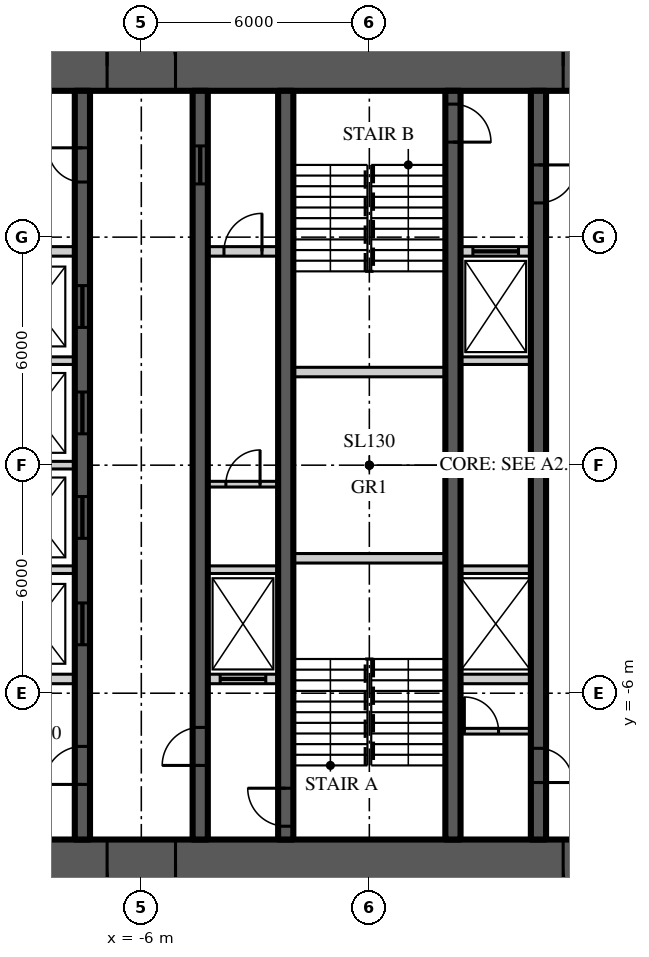
"""IFC4 building model, lengths in metres.
Left out: names, types, materials, properties, quantities, classifications, styles, units other than length and angle.
Written with IfcOpenShell. Run it as: python <this file> out.ifc"""

import sys

from ifc_helpers import new_model, si_unit, direction, frame, frame_2d, origin, place, context, subcontext, project, spatial, rectangle, extrude, element, fill, save


model = new_model("IFC4")
c1 = context("Model", 3, precision=1e-05, world=origin(), true_north=direction((0.0, 1.0)))
c2 = subcontext(c1, "Body", "Model", "MODEL_VIEW")
j1 = project(units=[si_unit("LENGTHUNIT", "METRE"), si_unit("PLANEANGLEUNIT", "RADIAN")], contexts=[c1])
p1 = place(None, origin())
s1 = spatial("IfcSite", under=j1, at=p1, CompositionType="ELEMENT")
p2 = place(p1, origin())
s2 = spatial("IfcBuilding", under=s1, at=p2, CompositionType="ELEMENT")
p3 = place(p2, frame((0.0, 0.0, 90.3)))
s3 = spatial("IfcBuildingStorey", under=s2, at=p3, CompositionType="ELEMENT", Elevation=90.3)
p4 = place(p3, frame((-11.15, 10.5, 0.0), z_axis=(0.0, 0.0, 1.0), x_axis=(1.0, 0.0, 0.0)))
e1 = element("IfcWall", 1, at=p4, inside=s3, PredefinedType="SHEAR", context=c2, shape_type="SweptSolid", body=[
    extrude(rectangle(XDim=22.3, YDim=1.3, at=frame_2d((11.15, 0.0))), origin(), (0.0, 0.0, 1.0), 3.9),
])
p5 = place(p4, frame((4.25, 0.0, 0.0)))
e2 = element("IfcOpeningElement", 2, at=p5, cuts=e1, PredefinedType="OPENING", context=c2, shape_type="SweptSolid", body=[
    extrude(rectangle(XDim=1.8, YDim=2.2, at=frame_2d((0.9, 1.1))), frame((0.0, 0.66, 0.0), z_axis=(0.0, -1.0, 0.0), x_axis=(1.0, 0.0, 0.0)), (0.0, 0.0, 1.0), 1.32),
])
p6 = place(p4, frame((16.25, 0.0, 0.0)))
e3 = element("IfcOpeningElement", 3, at=p6, cuts=e1, PredefinedType="OPENING", context=c2, shape_type="SweptSolid", body=[
    extrude(rectangle(XDim=1.8, YDim=2.2, at=frame_2d((0.9, 1.1))), frame((0.0, 0.66, 0.0), z_axis=(0.0, -1.0, 0.0), x_axis=(1.0, 0.0, 0.0)), (0.0, 0.0, 1.0), 1.32),
])
p7 = place(p3, frame((11.15, -10.5, 0.0), z_axis=(0.0, 0.0, 1.0), x_axis=(-1.0, 0.0, 0.0)))
e4 = element("IfcWall", 4, at=p7, inside=s3, PredefinedType="SHEAR", context=c2, shape_type="SweptSolid", body=[
    extrude(rectangle(XDim=22.3, YDim=1.3, at=frame_2d((11.15, 0.0))), origin(), (0.0, 0.0, 1.0), 3.9),
])
p8 = place(p7, frame((16.25, 0.0, 0.0)))
e5 = element("IfcOpeningElement", 5, at=p8, cuts=e4, PredefinedType="OPENING", context=c2, shape_type="SweptSolid", body=[
    extrude(rectangle(XDim=1.8, YDim=2.2, at=frame_2d((0.9, 1.1))), frame((0.0, 0.66, 0.0), z_axis=(0.0, -1.0, 0.0), x_axis=(1.0, 0.0, 0.0)), (0.0, 0.0, 1.0), 1.32),
])
p9 = place(p7, frame((4.25, 0.0, 0.0)))
e6 = element("IfcOpeningElement", 6, at=p9, cuts=e4, PredefinedType="OPENING", context=c2, shape_type="SweptSolid", body=[
    extrude(rectangle(XDim=1.8, YDim=2.2, at=frame_2d((0.9, 1.1))), frame((0.0, 0.66, 0.0), z_axis=(0.0, -1.0, 0.0), x_axis=(1.0, 0.0, 0.0)), (0.0, 0.0, 1.0), 1.32),
])
p10 = place(p3, frame((-7.55, -9.85, 0.0), z_axis=(0.0, 0.0, 1.0), x_axis=(0.0, 1.0, 0.0)))
e7 = element("IfcWall", 7, at=p10, inside=s3, PredefinedType="SHEAR", context=c2, shape_type="SweptSolid", body=[
    extrude(rectangle(XDim=19.7, YDim=0.4, at=frame_2d((9.85, 0.0))), origin(), (0.0, 0.0, 1.0), 3.9),
])
p11 = place(p10, frame((1.45, 0.0, 0.0)))
e8 = element("IfcOpeningElement", 8, at=p11, cuts=e7, PredefinedType="OPENING", context=c2, shape_type="SweptSolid", body=[
    extrude(rectangle(XDim=1.0, YDim=2.2, at=frame_2d((0.5, 1.1))), frame((0.0, 0.21, 0.0), z_axis=(0.0, -1.0, 0.0), x_axis=(1.0, 0.0, 0.0)), (0.0, 0.0, 1.0), 0.42),
])
p12 = place(p10, frame((17.3, 0.0, 0.0)))
e9 = element("IfcOpeningElement", 9, at=p12, cuts=e7, PredefinedType="OPENING", context=c2, shape_type="SweptSolid", body=[
    extrude(rectangle(XDim=0.9, YDim=2.1, at=frame_2d((0.45, 1.05))), frame((0.0, 0.21, 0.0), z_axis=(0.0, -1.0, 0.0), x_axis=(1.0, 0.0, 0.0)), (0.0, 0.0, 1.0), 0.42),
])
p13 = place(p10, frame((5.125, 0.0, 0.0)))
e10 = element("IfcOpeningElement", 10, at=p13, cuts=e7, PredefinedType="OPENING", context=c2, shape_type="SweptSolid", body=[
    extrude(rectangle(XDim=1.1, YDim=2.2, at=frame_2d((0.55, 1.1))), frame((0.0, 0.21, 0.0), z_axis=(0.0, -1.0, 0.0), x_axis=(1.0, 0.0, 0.0)), (0.0, 0.0, 1.0), 0.42),
])
p14 = place(p10, frame((7.925, 0.0, 0.0)))
e11 = element("IfcOpeningElement", 11, at=p14, cuts=e7, PredefinedType="OPENING", context=c2, shape_type="SweptSolid", body=[
    extrude(rectangle(XDim=1.1, YDim=2.2, at=frame_2d((0.55, 1.1))), frame((0.0, 0.21, 0.0), z_axis=(0.0, -1.0, 0.0), x_axis=(1.0, 0.0, 0.0)), (0.0, 0.0, 1.0), 0.42),
])
p15 = place(p10, frame((10.675, 0.0, 0.0)))
e12 = element("IfcOpeningElement", 12, at=p15, cuts=e7, PredefinedType="OPENING", context=c2, shape_type="SweptSolid", body=[
    extrude(rectangle(XDim=1.1, YDim=2.2, at=frame_2d((0.55, 1.1))), frame((0.0, 0.21, 0.0), z_axis=(0.0, -1.0, 0.0), x_axis=(1.0, 0.0, 0.0)), (0.0, 0.0, 1.0), 0.42),
])
p16 = place(p10, frame((13.475, 0.0, 0.0)))
e13 = element("IfcOpeningElement", 13, at=p16, cuts=e7, PredefinedType="OPENING", context=c2, shape_type="SweptSolid", body=[
    extrude(rectangle(XDim=1.1, YDim=2.2, at=frame_2d((0.55, 1.1))), frame((0.0, 0.21, 0.0), z_axis=(0.0, -1.0, 0.0), x_axis=(1.0, 0.0, 0.0)), (0.0, 0.0, 1.0), 0.42),
])
p17 = place(p3, frame((-4.45, -9.85, 0.0), z_axis=(0.0, 0.0, 1.0), x_axis=(0.0, 1.0, 0.0)))
e14 = element("IfcWall", 14, at=p17, inside=s3, PredefinedType="SHEAR", context=c2, shape_type="SweptSolid", body=[
    extrude(rectangle(XDim=19.7, YDim=0.4, at=frame_2d((9.85, 0.0))), origin(), (0.0, 0.0, 1.0), 3.9),
])
p18 = place(p17, frame((1.95, 0.0, 0.0)))
e15 = element("IfcOpeningElement", 15, at=p18, cuts=e14, PredefinedType="OPENING", context=c2, shape_type="SweptSolid", body=[
    extrude(rectangle(XDim=1.0, YDim=2.2, at=frame_2d((0.5, 1.1))), frame((0.0, 0.21, 0.0), z_axis=(0.0, -1.0, 0.0), x_axis=(1.0, 0.0, 0.0)), (0.0, 0.0, 1.0), 0.42),
])
p19 = place(p17, frame((17.25, 0.0, 0.0)))
e16 = element("IfcOpeningElement", 16, at=p19, cuts=e14, PredefinedType="OPENING", context=c2, shape_type="SweptSolid", body=[
    extrude(rectangle(XDim=1.0, YDim=2.1, at=frame_2d((0.5, 1.05))), frame((0.0, 0.21, 0.0), z_axis=(0.0, -1.0, 0.0), x_axis=(1.0, 0.0, 0.0)), (0.0, 0.0, 1.0), 0.42),
])
p20 = place(p3, frame((4.45, 9.85, 0.0), z_axis=(0.0, 0.0, 1.0), x_axis=(0.0, -1.0, 0.0)))
e17 = element("IfcWall", 17, at=p20, inside=s3, PredefinedType="SHEAR", context=c2, shape_type="SweptSolid", body=[
    extrude(rectangle(XDim=19.7, YDim=0.4, at=frame_2d((9.85, 0.0))), origin(), (0.0, 0.0, 1.0), 3.9),
])
p21 = place(p20, frame((1.95, 0.0, 0.0)))
e18 = element("IfcOpeningElement", 18, at=p21, cuts=e17, PredefinedType="OPENING", context=c2, shape_type="SweptSolid", body=[
    extrude(rectangle(XDim=1.0, YDim=2.2, at=frame_2d((0.5, 1.1))), frame((0.0, 0.21, 0.0), z_axis=(0.0, -1.0, 0.0), x_axis=(1.0, 0.0, 0.0)), (0.0, 0.0, 1.0), 0.42),
])
p22 = place(p20, frame((17.3, 0.0, 0.0)))
e19 = element("IfcOpeningElement", 19, at=p22, cuts=e17, PredefinedType="OPENING", context=c2, shape_type="SweptSolid", body=[
    extrude(rectangle(XDim=0.9, YDim=2.1, at=frame_2d((0.45, 1.05))), frame((0.0, 0.21, 0.0), z_axis=(0.0, -1.0, 0.0), x_axis=(1.0, 0.0, 0.0)), (0.0, 0.0, 1.0), 0.42),
])
p23 = place(p3, frame((-2.2, -9.85, 0.0), z_axis=(0.0, 0.0, 1.0), x_axis=(0.0, 1.0, 0.0)))
e20 = element("IfcWall", 20, at=p23, inside=s3, PredefinedType="SHEAR", context=c2, shape_type="SweptSolid", body=[
    extrude(rectangle(XDim=19.7, YDim=0.4, at=frame_2d((9.85, 0.0))), origin(), (0.0, 0.0, 1.0), 3.9),
])
p24 = place(p23, frame((0.35, 0.0, 0.0)))
e21 = element("IfcOpeningElement", 21, at=p24, cuts=e20, PredefinedType="OPENING", context=c2, shape_type="SweptSolid", body=[
    extrude(rectangle(XDim=1.0, YDim=2.2, at=frame_2d((0.5, 1.1))), frame((0.0, 0.21, 0.0), z_axis=(0.0, -1.0, 0.0), x_axis=(1.0, 0.0, 0.0)), (0.0, 0.0, 1.0), 0.42),
])
p25 = place(p3, frame((2.2, 9.85, 0.0), z_axis=(0.0, 0.0, 1.0), x_axis=(0.0, -1.0, 0.0)))
e22 = element("IfcWall", 22, at=p25, inside=s3, PredefinedType="SHEAR", context=c2, shape_type="SweptSolid", body=[
    extrude(rectangle(XDim=19.7, YDim=0.4, at=frame_2d((9.85, 0.0))), origin(), (0.0, 0.0, 1.0), 3.9),
])
p26 = place(p25, frame((0.35, 0.0, 0.0)))
e23 = element("IfcOpeningElement", 23, at=p26, cuts=e22, PredefinedType="OPENING", context=c2, shape_type="SweptSolid", body=[
    extrude(rectangle(XDim=1.0, YDim=2.2, at=frame_2d((0.5, 1.1))), frame((0.0, 0.21, 0.0), z_axis=(0.0, -1.0, 0.0), x_axis=(1.0, 0.0, 0.0)), (0.0, 0.0, 1.0), 0.42),
])
p27 = place(p3, frame((-9.85, 5.625, 0.0), z_axis=(0.0, 0.0, 1.0), x_axis=(1.0, 0.0, 0.0)))
e24 = element("IfcWall", 24, at=p27, inside=s3, PredefinedType="SOLIDWALL", context=c2, shape_type="SweptSolid", body=[
    extrude(rectangle(XDim=2.1, YDim=0.25, at=frame_2d((1.05, 0.0))), origin(), (0.0, 0.0, 1.0), 3.7),
])
p28 = place(p3, frame((-4.25, 5.625, 0.0), z_axis=(0.0, 0.0, 1.0), x_axis=(1.0, 0.0, 0.0)))
e25 = element("IfcWall", 25, at=p28, inside=s3, PredefinedType="SOLIDWALL", context=c2, shape_type="SweptSolid", body=[
    extrude(rectangle(XDim=1.85, YDim=0.25, at=frame_2d((0.925, 0.0))), origin(), (0.0, 0.0, 1.0), 3.7),
])
p29 = place(p28, frame((0.425, 0.0, 0.0)))
e26 = element("IfcOpeningElement", 26, at=p29, cuts=e25, PredefinedType="OPENING", context=c2, shape_type="SweptSolid", body=[
    extrude(rectangle(XDim=1.0, YDim=2.2, at=frame_2d((0.5, 1.1))), frame((0.0, 0.135, 0.0), z_axis=(0.0, -1.0, 0.0), x_axis=(1.0, 0.0, 0.0)), (0.0, 0.0, 1.0), 0.27),
])
p30 = place(p3, frame((2.4, 5.625, 0.0), z_axis=(0.0, 0.0, 1.0), x_axis=(1.0, 0.0, 0.0)))
e27 = element("IfcWall", 27, at=p30, inside=s3, PredefinedType="SOLIDWALL", context=c2, shape_type="SweptSolid", body=[
    extrude(rectangle(XDim=1.85, YDim=0.25, at=frame_2d((0.925, 0.0))), origin(), (0.0, 0.0, 1.0), 3.7),
])
p31 = place(p30, frame((0.325, 0.0, 0.0)))
e28 = element("IfcOpeningElement", 28, at=p31, cuts=e27, PredefinedType="OPENING", context=c2, shape_type="SweptSolid", body=[
    extrude(rectangle(XDim=1.2, YDim=2.2, at=frame_2d((0.6, 1.1))), frame((0.0, 0.135, 0.0), z_axis=(0.0, -1.0, 0.0), x_axis=(1.0, 0.0, 0.0)), (0.0, 0.0, 1.0), 0.27),
])
p32 = place(p3, frame((-9.85, -5.625, 0.0), z_axis=(0.0, 0.0, 1.0), x_axis=(1.0, 0.0, 0.0)))
e29 = element("IfcWall", 29, at=p32, inside=s3, PredefinedType="SOLIDWALL", context=c2, shape_type="SweptSolid", body=[
    extrude(rectangle(XDim=2.1, YDim=0.25, at=frame_2d((1.05, 0.0))), origin(), (0.0, 0.0, 1.0), 3.7),
])
p33 = place(p3, frame((-4.25, -5.625, 0.0), z_axis=(0.0, 0.0, 1.0), x_axis=(1.0, 0.0, 0.0)))
e30 = element("IfcWall", 30, at=p33, inside=s3, PredefinedType="SOLIDWALL", context=c2, shape_type="SweptSolid", body=[
    extrude(rectangle(XDim=1.85, YDim=0.25, at=frame_2d((0.925, 0.0))), origin(), (0.0, 0.0, 1.0), 3.7),
])
p34 = place(p33, frame((0.325, 0.0, 0.0)))
e31 = element("IfcOpeningElement", 31, at=p34, cuts=e30, PredefinedType="OPENING", context=c2, shape_type="SweptSolid", body=[
    extrude(rectangle(XDim=1.2, YDim=2.2, at=frame_2d((0.6, 1.1))), frame((0.0, 0.135, 0.0), z_axis=(0.0, -1.0, 0.0), x_axis=(1.0, 0.0, 0.0)), (0.0, 0.0, 1.0), 0.27),
])
p35 = place(p3, frame((2.4, -5.625, 0.0), z_axis=(0.0, 0.0, 1.0), x_axis=(1.0, 0.0, 0.0)))
e32 = element("IfcWall", 32, at=p35, inside=s3, PredefinedType="SOLIDWALL", context=c2, shape_type="SweptSolid", body=[
    extrude(rectangle(XDim=1.85, YDim=0.25, at=frame_2d((0.925, 0.0))), origin(), (0.0, 0.0, 1.0), 3.7),
])
for number, where, z_axis, x_axis in (
    (33, (-2.0, -2.45, 0.0), (0.0, 0.0, 1.0), (1.0, 0.0, 0.0)),
    (34, (-2.0, 2.45, 0.0), (0.0, 0.0, 1.0), (1.0, 0.0, 0.0)),
):
    element("IfcWall", number, at=place(p3, frame(where, z_axis=z_axis, x_axis=x_axis)), inside=s3, PredefinedType="SOLIDWALL", context=c2, shape_type="SweptSolid", body=[
        extrude(rectangle(XDim=4.0, YDim=0.25, at=frame_2d((2.0, 0.0))), origin(), (0.0, 0.0, 1.0), 3.7),
    ])
p36 = place(p3, frame((-9.85, -2.75, 0.0), z_axis=(0.0, 0.0, 1.0), x_axis=(1.0, 0.0, 0.0)))
e35 = element("IfcWall", 35, at=p36, inside=s3, PredefinedType="SOLIDWALL", context=c2, shape_type="SweptSolid", body=[
    extrude(rectangle(XDim=2.1, YDim=0.2, at=frame_2d((1.05, 0.0))), origin(), (0.0, 0.0, 1.0), 3.7),
])
for number, where, z_axis, x_axis in (
    (36, (-4.25, -2.75, 0.0), (0.0, 0.0, 1.0), (1.0, 0.0, 0.0)),
    (37, (2.4, -2.75, 0.0), (0.0, 0.0, 1.0), (1.0, 0.0, 0.0)),
):
    element("IfcWall", number, at=place(p3, frame(where, z_axis=z_axis, x_axis=x_axis)), inside=s3, PredefinedType="SOLIDWALL", context=c2, shape_type="SweptSolid", body=[
        extrude(rectangle(XDim=1.85, YDim=0.2, at=frame_2d((0.925, 0.0))), origin(), (0.0, 0.0, 1.0), 3.7),
    ])
for number, where, z_axis, x_axis in (
    (38, (-9.85, 0.0, 0.0), (0.0, 0.0, 1.0), (1.0, 0.0, 0.0)),
    (39, (-9.85, 2.75, 0.0), (0.0, 0.0, 1.0), (1.0, 0.0, 0.0)),
):
    element("IfcWall", number, at=place(p3, frame(where, z_axis=z_axis, x_axis=x_axis)), inside=s3, PredefinedType="SOLIDWALL", context=c2, shape_type="SweptSolid", body=[
        extrude(rectangle(XDim=2.1, YDim=0.2, at=frame_2d((1.05, 0.0))), origin(), (0.0, 0.0, 1.0), 3.7),
    ])
p37 = place(p3, frame((2.4, 2.75, 0.0), z_axis=(0.0, 0.0, 1.0), x_axis=(1.0, 0.0, 0.0)))
e40 = element("IfcWall", 40, at=p37, inside=s3, PredefinedType="SOLIDWALL", context=c2, shape_type="SweptSolid", body=[
    extrude(rectangle(XDim=1.85, YDim=0.2, at=frame_2d((0.925, 0.0))), origin(), (0.0, 0.0, 1.0), 3.7),
])
p38 = place(p3, frame((-4.25, -0.5, 0.0), z_axis=(0.0, 0.0, 1.0), x_axis=(1.0, 0.0, 0.0)))
e41 = element("IfcWall", 41, at=p38, inside=s3, PredefinedType="SOLIDWALL", context=c2, shape_type="SweptSolid", body=[
    extrude(rectangle(XDim=1.85, YDim=0.15, at=frame_2d((0.925, 0.0))), origin(), (0.0, 0.0, 1.0), 3.77),
])
p39 = place(p38, frame((0.475, 0.0, 0.0)))
e42 = element("IfcOpeningElement", 42, at=p39, cuts=e41, PredefinedType="OPENING", context=c2, shape_type="SweptSolid", body=[
    extrude(rectangle(XDim=0.9, YDim=2.1, at=frame_2d((0.45, 1.05))), frame((0.0, 0.085, 0.0), z_axis=(0.0, -1.0, 0.0), x_axis=(1.0, 0.0, 0.0)), (0.0, 0.0, 1.0), 0.17),
])
p40 = place(p3, frame((2.4, -7.0, 0.0), z_axis=(0.0, 0.0, 1.0), x_axis=(1.0, 0.0, 0.0)))
e43 = element("IfcWall", 43, at=p40, inside=s3, PredefinedType="SOLIDWALL", context=c2, shape_type="SweptSolid", body=[
    extrude(rectangle(XDim=1.85, YDim=0.15, at=frame_2d((0.925, 0.0))), origin(), (0.0, 0.0, 1.0), 3.77),
])
p41 = place(p40, frame((0.1, 0.0, 0.0)))
e44 = element("IfcOpeningElement", 44, at=p41, cuts=e43, PredefinedType="OPENING", context=c2, shape_type="SweptSolid", body=[
    extrude(rectangle(XDim=0.9, YDim=2.1, at=frame_2d((0.45, 1.05))), frame((0.0, 0.085, 0.0), z_axis=(0.0, -1.0, 0.0), x_axis=(1.0, 0.0, 0.0)), (0.0, 0.0, 1.0), 0.17),
])
p42 = place(p5, origin())
e45 = element("IfcDoor", 45, at=p42, inside=s3, OperationType="DOUBLE_DOOR_DOUBLE_SWING", PredefinedType="DOOR", context=c2, shape_type="SweptSolid", body=[
    extrude(rectangle(XDim=1.8, YDim=2.2, at=frame_2d((0.9, 1.1))), frame((0.0, 0.025, 0.0), z_axis=(0.0, -1.0, 0.0), x_axis=(1.0, 0.0, 0.0)), (0.0, 0.0, 1.0), 0.05),
])
fill(e2, e45)
p43 = place(p8, origin())
e46 = element("IfcDoor", 46, at=p43, inside=s3, OperationType="DOUBLE_DOOR_DOUBLE_SWING", PredefinedType="DOOR", context=c2, shape_type="SweptSolid", body=[
    extrude(rectangle(XDim=1.8, YDim=2.2, at=frame_2d((0.9, 1.1))), frame((0.0, 0.025, 0.0), z_axis=(0.0, -1.0, 0.0), x_axis=(1.0, 0.0, 0.0)), (0.0, 0.0, 1.0), 0.05),
])
fill(e5, e46)
p44 = place(p6, origin())
e47 = element("IfcDoor", 47, at=p44, inside=s3, OperationType="DOUBLE_DOOR_DOUBLE_SWING", PredefinedType="DOOR", context=c2, shape_type="SweptSolid", body=[
    extrude(rectangle(XDim=1.8, YDim=2.2, at=frame_2d((0.9, 1.1))), frame((0.0, 0.025, 0.0), z_axis=(0.0, -1.0, 0.0), x_axis=(1.0, 0.0, 0.0)), (0.0, 0.0, 1.0), 0.05),
])
fill(e3, e47)
p45 = place(p9, origin())
e48 = element("IfcDoor", 48, at=p45, inside=s3, OperationType="DOUBLE_DOOR_DOUBLE_SWING", PredefinedType="DOOR", context=c2, shape_type="SweptSolid", body=[
    extrude(rectangle(XDim=1.8, YDim=2.2, at=frame_2d((0.9, 1.1))), frame((0.0, 0.025, 0.0), z_axis=(0.0, -1.0, 0.0), x_axis=(1.0, 0.0, 0.0)), (0.0, 0.0, 1.0), 0.05),
])
fill(e6, e48)
p46 = place(p11, origin())
e49 = element("IfcDoor", 49, at=p46, inside=s3, OperationType="SINGLE_SWING_LEFT", PredefinedType="DOOR", context=c2, shape_type="SweptSolid", body=[
    extrude(rectangle(XDim=1.0, YDim=2.2, at=frame_2d((0.5, 1.1))), frame((0.0, 0.025, 0.0), z_axis=(0.0, -1.0, 0.0), x_axis=(1.0, 0.0, 0.0)), (0.0, 0.0, 1.0), 0.05),
])
fill(e8, e49)
p47 = place(p18, origin())
e50 = element("IfcDoor", 50, at=p47, inside=s3, OperationType="SINGLE_SWING_LEFT", PredefinedType="DOOR", context=c2, shape_type="SweptSolid", body=[
    extrude(rectangle(XDim=1.0, YDim=2.2, at=frame_2d((0.5, 1.1))), frame((0.0, 0.025, 0.0), z_axis=(0.0, -1.0, 0.0), x_axis=(1.0, 0.0, 0.0)), (0.0, 0.0, 1.0), 0.05),
])
fill(e15, e50)
p48 = place(p24, origin())
e51 = element("IfcDoor", 51, at=p48, inside=s3, OperationType="SINGLE_SWING_RIGHT", PredefinedType="DOOR", context=c2, shape_type="SweptSolid", body=[
    extrude(rectangle(XDim=1.0, YDim=2.2, at=frame_2d((0.5, 1.1))), frame((0.0, 0.025, 0.0), z_axis=(0.0, -1.0, 0.0), x_axis=(1.0, 0.0, 0.0)), (0.0, 0.0, 1.0), 0.05),
])
fill(e21, e51)
p49 = place(p21, origin())
e52 = element("IfcDoor", 52, at=p49, inside=s3, OperationType="SINGLE_SWING_LEFT", PredefinedType="DOOR", context=c2, shape_type="SweptSolid", body=[
    extrude(rectangle(XDim=1.0, YDim=2.2, at=frame_2d((0.5, 1.1))), frame((0.0, 0.025, 0.0), z_axis=(0.0, -1.0, 0.0), x_axis=(1.0, 0.0, 0.0)), (0.0, 0.0, 1.0), 0.05),
])
fill(e18, e52)
p50 = place(p26, origin())
e53 = element("IfcDoor", 53, at=p50, inside=s3, OperationType="SINGLE_SWING_RIGHT", PredefinedType="DOOR", context=c2, shape_type="SweptSolid", body=[
    extrude(rectangle(XDim=1.0, YDim=2.2, at=frame_2d((0.5, 1.1))), frame((0.0, 0.025, 0.0), z_axis=(0.0, -1.0, 0.0), x_axis=(1.0, 0.0, 0.0)), (0.0, 0.0, 1.0), 0.05),
])
fill(e23, e53)
p51 = place(p12, origin())
e54 = element("IfcDoor", 54, at=p51, inside=s3, OperationType="SINGLE_SWING_RIGHT", PredefinedType="DOOR", context=c2, shape_type="SweptSolid", body=[
    extrude(rectangle(XDim=0.9, YDim=2.1, at=frame_2d((0.45, 1.05))), frame((0.0, 0.025, 0.0), z_axis=(0.0, -1.0, 0.0), x_axis=(1.0, 0.0, 0.0)), (0.0, 0.0, 1.0), 0.05),
])
fill(e9, e54)
p52 = place(p19, origin())
e55 = element("IfcDoor", 55, at=p52, inside=s3, OperationType="SLIDING_TO_LEFT", PredefinedType="DOOR", context=c2, shape_type="SweptSolid", body=[
    extrude(rectangle(XDim=1.0, YDim=2.1, at=frame_2d((0.5, 1.05))), frame((0.0, 0.025, 0.0), z_axis=(0.0, -1.0, 0.0), x_axis=(1.0, 0.0, 0.0)), (0.0, 0.0, 1.0), 0.05),
])
fill(e16, e55)
p53 = place(p22, origin())
e56 = element("IfcDoor", 56, at=p53, inside=s3, OperationType="SINGLE_SWING_RIGHT", PredefinedType="DOOR", context=c2, shape_type="SweptSolid", body=[
    extrude(rectangle(XDim=0.9, YDim=2.1, at=frame_2d((0.45, 1.05))), frame((0.0, 0.025, 0.0), z_axis=(0.0, -1.0, 0.0), x_axis=(1.0, 0.0, 0.0)), (0.0, 0.0, 1.0), 0.05),
])
fill(e19, e56)
p54 = place(p13, origin())
e57 = element("IfcDoor", 57, at=p54, inside=s3, OperationType="SLIDING_TO_LEFT", PredefinedType="DOOR", context=c2, shape_type="SweptSolid", body=[
    extrude(rectangle(XDim=1.1, YDim=2.2, at=frame_2d((0.55, 1.1))), frame((0.0, 0.025, 0.0), z_axis=(0.0, -1.0, 0.0), x_axis=(1.0, 0.0, 0.0)), (0.0, 0.0, 1.0), 0.05),
])
fill(e10, e57)
p55 = place(p14, origin())
e58 = element("IfcDoor", 58, at=p55, inside=s3, OperationType="SLIDING_TO_LEFT", PredefinedType="DOOR", context=c2, shape_type="SweptSolid", body=[
    extrude(rectangle(XDim=1.1, YDim=2.2, at=frame_2d((0.55, 1.1))), frame((0.0, 0.025, 0.0), z_axis=(0.0, -1.0, 0.0), x_axis=(1.0, 0.0, 0.0)), (0.0, 0.0, 1.0), 0.05),
])
fill(e11, e58)
p56 = place(p15, origin())
e59 = element("IfcDoor", 59, at=p56, inside=s3, OperationType="SLIDING_TO_LEFT", PredefinedType="DOOR", context=c2, shape_type="SweptSolid", body=[
    extrude(rectangle(XDim=1.1, YDim=2.2, at=frame_2d((0.55, 1.1))), frame((0.0, 0.025, 0.0), z_axis=(0.0, -1.0, 0.0), x_axis=(1.0, 0.0, 0.0)), (0.0, 0.0, 1.0), 0.05),
])
fill(e12, e59)
p57 = place(p16, origin())
e60 = element("IfcDoor", 60, at=p57, inside=s3, OperationType="SLIDING_TO_LEFT", PredefinedType="DOOR", context=c2, shape_type="SweptSolid", body=[
    extrude(rectangle(XDim=1.1, YDim=2.2, at=frame_2d((0.55, 1.1))), frame((0.0, 0.025, 0.0), z_axis=(0.0, -1.0, 0.0), x_axis=(1.0, 0.0, 0.0)), (0.0, 0.0, 1.0), 0.05),
])
fill(e13, e60)
p58 = place(p34, origin())
e61 = element("IfcDoor", 61, at=p58, inside=s3, OperationType="SLIDING_TO_LEFT", PredefinedType="DOOR", context=c2, shape_type="SweptSolid", body=[
    extrude(rectangle(XDim=1.2, YDim=2.2, at=frame_2d((0.6, 1.1))), frame((0.0, 0.025, 0.0), z_axis=(0.0, -1.0, 0.0), x_axis=(1.0, 0.0, 0.0)), (0.0, 0.0, 1.0), 0.05),
])
fill(e31, e61)
p59 = place(p31, origin())
e62 = element("IfcDoor", 62, at=p59, inside=s3, OperationType="SLIDING_TO_LEFT", PredefinedType="DOOR", context=c2, shape_type="SweptSolid", body=[
    extrude(rectangle(XDim=1.2, YDim=2.2, at=frame_2d((0.6, 1.1))), frame((0.0, 0.025, 0.0), z_axis=(0.0, -1.0, 0.0), x_axis=(1.0, 0.0, 0.0)), (0.0, 0.0, 1.0), 0.05),
])
fill(e28, e62)
p60 = place(p39, origin())
e63 = element("IfcDoor", 63, at=p60, inside=s3, OperationType="SINGLE_SWING_RIGHT", PredefinedType="DOOR", context=c2, shape_type="SweptSolid", body=[
    extrude(rectangle(XDim=0.9, YDim=2.1, at=frame_2d((0.45, 1.05))), frame((0.0, 0.025, 0.0), z_axis=(0.0, -1.0, 0.0), x_axis=(1.0, 0.0, 0.0)), (0.0, 0.0, 1.0), 0.05),
])
fill(e42, e63)
p61 = place(p29, origin())
e64 = element("IfcDoor", 64, at=p61, inside=s3, OperationType="SINGLE_SWING_RIGHT", PredefinedType="DOOR", context=c2, shape_type="SweptSolid", body=[
    extrude(rectangle(XDim=1.0, YDim=2.2, at=frame_2d((0.5, 1.1))), frame((0.0, 0.025, 0.0), z_axis=(0.0, -1.0, 0.0), x_axis=(1.0, 0.0, 0.0)), (0.0, 0.0, 1.0), 0.05),
])
fill(e26, e64)
p62 = place(p41, origin())
e65 = element("IfcDoor", 65, at=p62, inside=s3, OperationType="SINGLE_SWING_LEFT", PredefinedType="DOOR", context=c2, shape_type="SweptSolid", body=[
    extrude(rectangle(XDim=0.9, YDim=2.1, at=frame_2d((0.45, 1.05))), frame((0.0, 0.025, 0.0), z_axis=(0.0, -1.0, 0.0), x_axis=(1.0, 0.0, 0.0)), (0.0, 0.0, 1.0), 0.05),
])
fill(e44, e65)
save(model, sys.argv[1])
